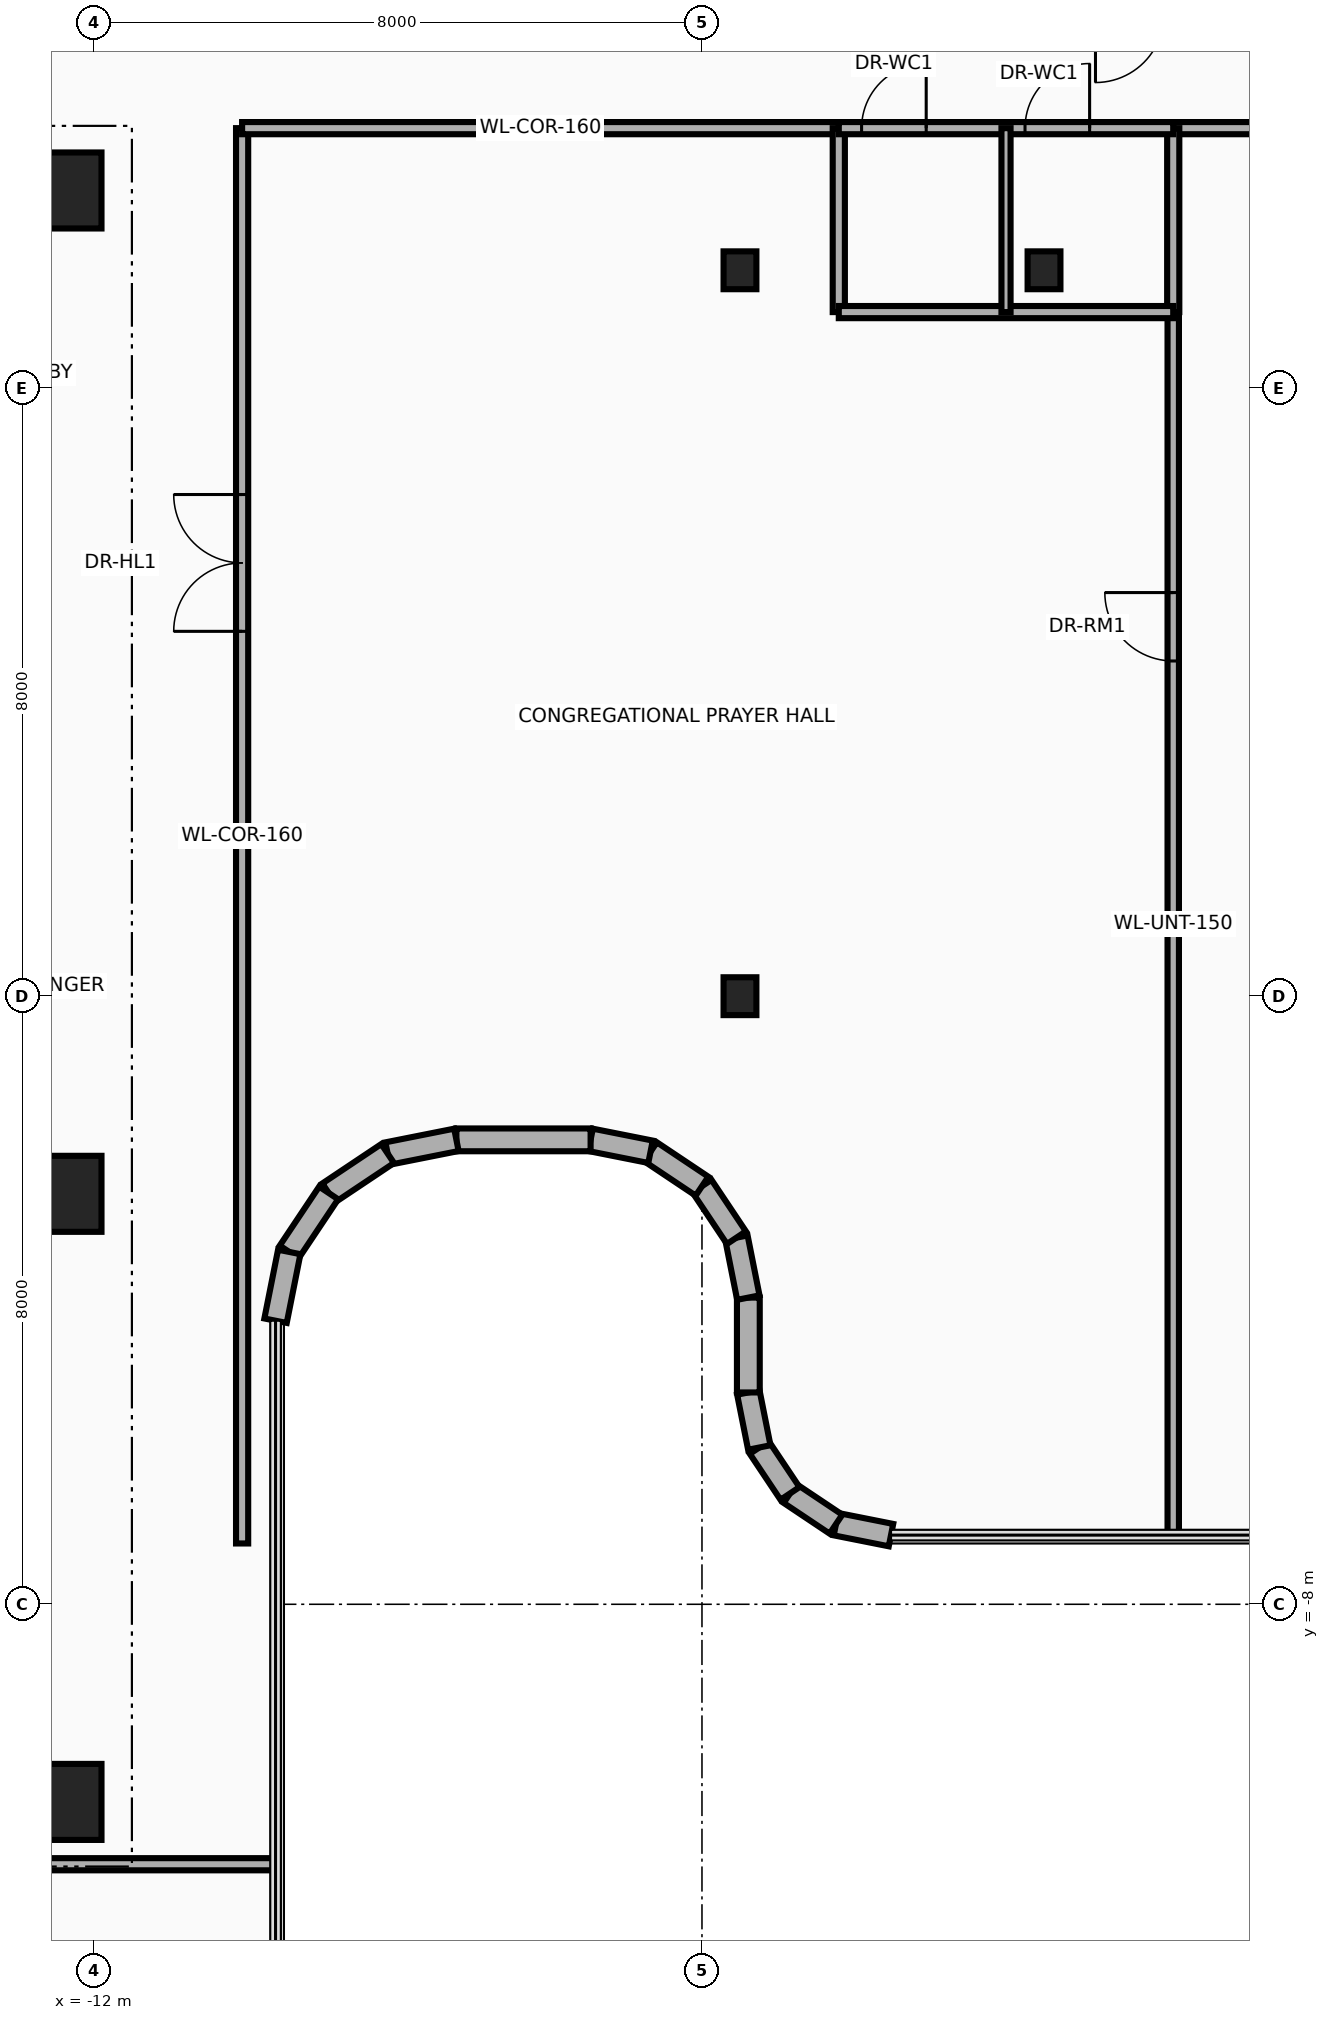
"""IFC4 building model, lengths in metres.
Left out: names, types, materials, properties, quantities, classifications, styles, units other than length and angle.
Written with IfcOpenShell. Run it as: python <this file> out.ifc"""

import sys

from ifc_helpers import new_model, si_unit, direction, frame, frame_2d, origin, origin_2d, place, context, subcontext, project, spatial, rectangle, i_section, extrude, source, transform, mapped, element, fill, save


model = new_model("IFC4")
c1 = context("Model", 3, precision=1e-05, world=origin(), true_north=direction((0.0, 1.0)))
c2 = subcontext(c1, "Body", "Model", "MODEL_VIEW")
j1 = project(units=[si_unit("LENGTHUNIT", "METRE"), si_unit("PLANEANGLEUNIT", "RADIAN")], contexts=[c1])
p1 = place(None, origin())
s1 = spatial("IfcSite", under=j1, at=p1, CompositionType="ELEMENT")
p2 = place(p1, origin())
s2 = spatial("IfcBuilding", under=s1, at=p2, CompositionType="ELEMENT")
p3 = place(p2, frame((0.0, 0.0, 192.35)))
s3 = spatial("IfcBuildingStorey", under=s2, at=p3, CompositionType="ELEMENT", Elevation=192.35)
for number, where, z_axis, x_axis in (
    (1, (-22.65, 10.8, 0.0), (0.0, 0.0, 1.0), (1.0, 0.0, 0.0)),
    (2, (-22.65, -10.8, 0.0), (0.0, 0.0, 1.0), (1.0, 0.0, 0.0)),
):
    element("IfcWall", number, at=place(p3, frame(where, z_axis=z_axis, x_axis=x_axis)), inside=s3, PredefinedType="SHEAR", context=c2, shape_type="SweptSolid", body=[
        extrude(rectangle(XDim=10.25, YDim=0.55, at=frame_2d((5.125, 0.0))), origin(), (0.0, 0.0, 1.0), 3.71),
    ])
m1 = source(origin(), c2, "Body", "SweptSolid", [
    extrude(rectangle(XDim=1.0, YDim=1.0, at=origin_2d()), origin(), (0.0, 0.0, 1.0), 3.95),
])
for number, where, z_axis, x_axis in (
    (3, (-12.4, -10.6, 0.0), (0.0, 0.0, 1.0), (1.0, 0.0, 0.0)),
    (4, (-12.4, -2.6, 0.0), (0.0, 0.0, 1.0), (1.0, 0.0, 0.0)),
    (5, (-12.4, 10.6, 0.0), (0.0, 0.0, 1.0), (1.0, 0.0, 0.0)),
):
    element("IfcColumn", number, at=place(p3, frame(where, z_axis=z_axis, x_axis=x_axis)), inside=s3, PredefinedType="COLUMN", context=c2, shape_type="MappedRepresentation", body=[
        mapped(m1, transform((0.0, 0.0, 0.0), x_axis=(1.0, 0.0, 0.0), y_axis=(0.0, 1.0, 0.0), z_axis=(0.0, 0.0, 1.0), scale=1.0)),
    ])
m2 = source(origin(), c2, "Body", "SweptSolid", [
    extrude(i_section(OverallWidth=0.432, OverallDepth=0.498, WebThickness=0.056, FlangeThickness=0.089, at=origin_2d()), origin(), (0.0, 0.0, 1.0), 3.95),
])
for number, where, z_axis, x_axis in (
    (6, (-3.5, 0.0, 0.0), (0.0, 0.0, 1.0), (1.0, 0.0, 0.0)),
    (7, (-3.5, 9.55, 0.0), (0.0, 0.0, 1.0), (1.0, 0.0, 0.0)),
    (8, (0.5, 9.55, 0.0), (0.0, 0.0, 1.0), (1.0, 0.0, 0.0)),
):
    element("IfcColumn", number, at=place(p3, frame(where, z_axis=z_axis, x_axis=x_axis)), inside=s3, PredefinedType="COLUMN", context=c2, shape_type="MappedRepresentation", body=[
        mapped(m2, transform((0.0, 0.0, 0.0), x_axis=(1.0, 0.0, 0.0), y_axis=(0.0, 1.0, 0.0), z_axis=(0.0, 0.0, 1.0), scale=1.0)),
    ])
p4 = place(p3, frame((-1.513, -7.09, 0.0), z_axis=(0.0, 0.0, 1.0), x_axis=(-0.980783640462, 0.195098566376, 0.0)))
e9 = element("IfcWall", 9, at=p4, inside=s3, PredefinedType="SOLIDWALL", context=c2, shape_type="SweptSolid", body=[
    extrude(rectangle(XDim=0.738, YDim=0.3, at=frame_2d((0.369, 0.0))), origin(), (0.0, 0.0, 1.0), 3.156),
])
p5 = place(p3, frame((-2.237, -6.946, 0.0), z_axis=(0.0, 0.0, 1.0), x_axis=(-0.831378135196, 0.555707113792, 0.0)))
e10 = element("IfcWall", 10, at=p5, inside=s3, PredefinedType="SOLIDWALL", context=c2, shape_type="SweptSolid", body=[
    extrude(rectangle(XDim=0.727, YDim=0.3, at=frame_2d((0.364, 0.0))), origin(), (0.0, 0.0, 1.0), 3.71),
])
p6 = place(p3, frame((-2.842, -6.542, 0.0), z_axis=(0.0, 0.0, 1.0), x_axis=(-0.555784030735, 0.83132671747, 0.0)))
e11 = element("IfcWall", 11, at=p6, inside=s3, PredefinedType="SOLIDWALL", context=c2, shape_type="SweptSolid", body=[
    extrude(rectangle(XDim=0.728, YDim=0.3, at=frame_2d((0.364, 0.0))), origin(), (0.0, 0.0, 1.0), 2.695),
])
p7 = place(p3, frame((-3.246, -5.937, 0.0), z_axis=(0.0, 0.0, 1.0), x_axis=(-0.194780446724, 0.980846867546, 0.0)))
e12 = element("IfcWall", 12, at=p7, inside=s3, PredefinedType="SOLIDWALL", context=c2, shape_type="SweptSolid", body=[
    extrude(rectangle(XDim=0.738, YDim=0.3, at=frame_2d((0.369, 0.0))), origin(), (0.0, 0.0, 1.0), 2.695),
])
p8 = place(p3, frame((-3.39, -5.213, 0.0), z_axis=(0.0, 0.0, 1.0), x_axis=(0.0, 1.0, 0.0)))
e13 = element("IfcWall", 13, at=p8, inside=s3, PredefinedType="SOLIDWALL", context=c2, shape_type="SweptSolid", body=[
    extrude(rectangle(XDim=1.248, YDim=0.3, at=frame_2d((0.624, 0.0))), origin(), (0.0, 0.0, 1.0), 2.695),
])
p9 = place(p3, frame((-3.39, -3.965, 0.0), z_axis=(0.0, 0.0, 1.0), x_axis=(-0.195356525272, 0.980732291726, 0.0)))
e14 = element("IfcWall", 14, at=p9, inside=s3, PredefinedType="SOLIDWALL", context=c2, shape_type="SweptSolid", body=[
    extrude(rectangle(XDim=0.803, YDim=0.3, at=frame_2d((0.402, 0.0))), origin(), (0.0, 0.0, 1.0), 2.695),
])
for number, where, z_axis, x_axis in (
    (15, (-3.547, -3.177, 0.0), (0.0, 0.0, 1.0), (-0.556, 0.831, 0.0)),
    (16, (-4.0, -2.5, 0.0), (0.0, 0.0, 1.0), (-0.831, 0.556, 0.0)),
):
    element("IfcWall", number, at=place(p3, frame(where, z_axis=z_axis, x_axis=x_axis)), inside=s3, PredefinedType="SOLIDWALL", context=c2, shape_type="SweptSolid", body=[
        extrude(rectangle(XDim=0.815, YDim=0.3, at=frame_2d((0.407, 0.0))), origin(), (0.0, 0.0, 1.0), 2.695),
    ])
p10 = place(p3, frame((-4.677, -2.047, 0.0), z_axis=(0.0, 0.0, 1.0), x_axis=(-0.980732291726, 0.195356525272, 0.0)))
e17 = element("IfcWall", 17, at=p10, inside=s3, PredefinedType="SOLIDWALL", context=c2, shape_type="SweptSolid", body=[
    extrude(rectangle(XDim=0.803, YDim=0.3, at=frame_2d((0.402, 0.0))), origin(), (0.0, 0.0, 1.0), 3.71),
])
p11 = place(p3, frame((-5.465, -1.89, 0.0), z_axis=(0.0, 0.0, 1.0), x_axis=(-1.0, 0.0, 0.0)))
e18 = element("IfcWall", 18, at=p11, inside=s3, PredefinedType="SOLIDWALL", context=c2, shape_type="SweptSolid", body=[
    extrude(rectangle(XDim=1.766, YDim=0.3, at=frame_2d((0.883, 0.0))), origin(), (0.0, 0.0, 1.0), 3.71),
])
p12 = place(p3, frame((-7.231, -1.89, 0.0), z_axis=(0.0, 0.0, 1.0), x_axis=(-0.980743190895, -0.195301801101, 0.0)))
e19 = element("IfcWall", 19, at=p12, inside=s3, PredefinedType="SOLIDWALL", context=c2, shape_type="SweptSolid", body=[
    extrude(rectangle(XDim=0.923, YDim=0.3, at=frame_2d((0.461, 0.0))), origin(), (0.0, 0.0, 1.0), 2.495),
])
p13 = place(p3, frame((-8.135, -2.07, 0.0), z_axis=(0.0, 0.0, 1.0), x_axis=(-0.831607331814, -0.555364065883, 0.0)))
e20 = element("IfcWall", 20, at=p13, inside=s3, PredefinedType="SOLIDWALL", context=c2, shape_type="SweptSolid", body=[
    extrude(rectangle(XDim=0.933, YDim=0.3, at=frame_2d((0.467, 0.0))), origin(), (0.0, 0.0, 1.0), 2.495),
])
p14 = place(p3, frame((-8.912, -2.588, 0.0), z_axis=(0.0, 0.0, 1.0), x_axis=(-0.555364065883, -0.831607331814, 0.0)))
e21 = element("IfcWall", 21, at=p14, inside=s3, PredefinedType="SOLIDWALL", context=c2, shape_type="SweptSolid", body=[
    extrude(rectangle(XDim=0.933, YDim=0.3, at=frame_2d((0.467, 0.0))), origin(), (0.0, 0.0, 1.0), 3.71),
])
p15 = place(p3, frame((-9.43, -3.365, 0.0), z_axis=(0.0, 0.0, 1.0), x_axis=(-0.195301801101, -0.980743190895, 0.0)))
e22 = element("IfcWall", 22, at=p15, inside=s3, PredefinedType="SOLIDWALL", context=c2, shape_type="SweptSolid", body=[
    extrude(rectangle(XDim=0.923, YDim=0.3, at=frame_2d((0.461, 0.0))), origin(), (0.0, 0.0, 1.0), 3.71),
])
p16 = place(p3, frame((-23.45, -11.42, 0.0), z_axis=(0.0, 0.0, 1.0), x_axis=(1.0, 0.0, 0.0)))
e23 = element("IfcWall", 23, at=p16, inside=s3, PredefinedType="PARTITIONING", context=c2, shape_type="SweptSolid", body=[
    extrude(rectangle(XDim=13.84, YDim=0.16, at=frame_2d((6.92, 0.0))), origin(), (0.0, 0.0, 1.0), 3.084),
])
p17 = place(p3, frame((-10.05, -7.2, 0.0), z_axis=(0.0, 0.0, 1.0), x_axis=(0.0, 1.0, 0.0)))
e24 = element("IfcWall", 24, at=p17, inside=s3, PredefinedType="PARTITIONING", context=c2, shape_type="SweptSolid", body=[
    extrude(rectangle(XDim=18.62, YDim=0.16, at=frame_2d((9.31, 0.0))), origin(), (0.0, 0.0, 1.0), 2.495),
])
p18 = place(p17, frame((12.0, 0.0, 0.0)))
e25 = element("IfcOpeningElement", 25, at=p18, cuts=e24, PredefinedType="OPENING", context=c2, shape_type="SweptSolid", body=[
    extrude(rectangle(XDim=1.8, YDim=2.15, at=frame_2d((0.9, 1.075))), frame((0.0, 0.095, 0.0), z_axis=(0.0, -1.0, 0.0), x_axis=(1.0, 0.0, 0.0)), (0.0, 0.0, 1.0), 0.19),
])
p19 = place(p3, frame((-10.05, 11.42, 0.0), z_axis=(0.0, 0.0, 1.0), x_axis=(1.0, 0.0, 0.0)))
e26 = element("IfcWall", 26, at=p19, inside=s3, PredefinedType="PARTITIONING", context=c2, shape_type="SweptSolid", body=[
    extrude(rectangle(XDim=7.85, YDim=0.16, at=frame_2d((3.925, 0.0))), origin(), (0.0, 0.0, 1.0), 2.695),
])
p20 = place(p3, frame((2.2, 11.42, 0.0), z_axis=(0.0, 0.0, 1.0), x_axis=(1.0, 0.0, 0.0)))
e27 = element("IfcWall", 27, at=p20, inside=s3, PredefinedType="PARTITIONING", context=c2, shape_type="SweptSolid", body=[
    extrude(rectangle(XDim=11.22, YDim=0.16, at=frame_2d((5.61, 0.0))), origin(), (0.0, 0.0, 1.0), 2.695),
])
p21 = place(p20, frame((4.0, 0.0, 0.0)))
e28 = element("IfcOpeningElement", 28, at=p21, cuts=e27, PredefinedType="OPENING", context=c2, shape_type="SweptSolid", body=[
    extrude(rectangle(XDim=1.8, YDim=2.15, at=frame_2d((0.9, 1.075))), frame((0.0, 0.095, 0.0), z_axis=(0.0, -1.0, 0.0), x_axis=(1.0, 0.0, 0.0)), (0.0, 0.0, 1.0), 0.19),
])
p22 = place(p3, frame((2.2, -7.09, 0.0), z_axis=(0.0, 0.0, 1.0), x_axis=(0.0, 1.0, 0.0)))
e29 = element("IfcWall", 29, at=p22, inside=s3, PredefinedType="PARTITIONING", context=c2, shape_type="SweptSolid", body=[
    extrude(rectangle(XDim=16.09, YDim=0.15, at=frame_2d((8.045, 0.0))), origin(), (0.0, 0.0, 1.0), 2.994),
])
p23 = place(p22, frame((11.5, 0.0, 0.0)))
e30 = element("IfcOpeningElement", 30, at=p23, cuts=e29, PredefinedType="OPENING", context=c2, shape_type="SweptSolid", body=[
    extrude(rectangle(XDim=0.9, YDim=2.1, at=frame_2d((0.45, 1.05))), frame((0.0, 0.09, 0.0), z_axis=(0.0, -1.0, 0.0), x_axis=(1.0, 0.0, 0.0)), (0.0, 0.0, 1.0), 0.18),
])
for number, where, z_axis, x_axis in (
    (31, (-2.2, 9.0, 0.0), (0.0, 0.0, 1.0), (0.0, 1.0, 0.0)),
    (32, (2.2, 9.0, 0.0), (0.0, 0.0, 1.0), (0.0, 1.0, 0.0)),
):
    element("IfcWall", number, at=place(p3, frame(where, z_axis=z_axis, x_axis=x_axis)), inside=s3, PredefinedType="PARTITIONING", context=c2, shape_type="SweptSolid", body=[
        extrude(rectangle(XDim=2.42, YDim=0.16, at=frame_2d((1.21, 0.0))), origin(), (0.0, 0.0, 1.0), 2.994),
    ])
p24 = place(p3, frame((-2.2, 9.0, 0.0), z_axis=(0.0, 0.0, 1.0), x_axis=(1.0, 0.0, 0.0)))
e33 = element("IfcWall", 33, at=p24, inside=s3, PredefinedType="PARTITIONING", context=c2, shape_type="SweptSolid", body=[
    extrude(rectangle(XDim=4.4, YDim=0.16, at=frame_2d((2.2, 0.0))), origin(), (0.0, 0.0, 1.0), 3.71),
])
p25 = place(p3, frame((-2.2, 11.42, 0.0), z_axis=(0.0, 0.0, 1.0), x_axis=(1.0, 0.0, 0.0)))
e34 = element("IfcWall", 34, at=p25, inside=s3, PredefinedType="PARTITIONING", context=c2, shape_type="SweptSolid", body=[
    extrude(rectangle(XDim=4.4, YDim=0.16, at=frame_2d((2.2, 0.0))), origin(), (0.0, 0.0, 1.0), 3.156),
])
p26 = place(p25, frame((0.3, 0.0, 0.0)))
e35 = element("IfcOpeningElement", 35, at=p26, cuts=e34, PredefinedType="OPENING", context=c2, shape_type="SweptSolid", body=[
    extrude(rectangle(XDim=0.85, YDim=2.1, at=frame_2d((0.425, 1.05))), frame((0.0, 0.095, 0.0), z_axis=(0.0, -1.0, 0.0), x_axis=(1.0, 0.0, 0.0)), (0.0, 0.0, 1.0), 0.19),
])
p27 = place(p25, frame((2.45, 0.0, 0.0)))
e36 = element("IfcOpeningElement", 36, at=p27, cuts=e34, PredefinedType="OPENING", context=c2, shape_type="SweptSolid", body=[
    extrude(rectangle(XDim=0.85, YDim=2.1, at=frame_2d((0.425, 1.05))), frame((0.0, 0.095, 0.0), z_axis=(0.0, -1.0, 0.0), x_axis=(1.0, 0.0, 0.0)), (0.0, 0.0, 1.0), 0.19),
])
p28 = place(p3, frame((0.0, 9.0, 0.0), z_axis=(0.0, 0.0, 1.0), x_axis=(0.0, 1.0, 0.0)))
e37 = element("IfcWall", 37, at=p28, inside=s3, PredefinedType="PARTITIONING", context=c2, shape_type="SweptSolid", body=[
    extrude(rectangle(XDim=2.42, YDim=0.12, at=frame_2d((1.21, 0.0))), origin(), (0.0, 0.0, 1.0), 2.994),
])
p29 = place(p18, origin())
e38 = element("IfcDoor", 38, at=p29, inside=s3, OperationType="DOUBLE_DOOR_SINGLE_SWING", PredefinedType="DOOR", context=c2, shape_type="SweptSolid", body=[
    extrude(rectangle(XDim=1.8, YDim=2.15, at=frame_2d((0.9, 1.075))), frame((0.0, 0.025, 0.0), z_axis=(0.0, -1.0, 0.0), x_axis=(1.0, 0.0, 0.0)), (0.0, 0.0, 1.0), 0.05),
])
fill(e25, e38)
p30 = place(p23, origin())
e39 = element("IfcDoor", 39, at=p30, inside=s3, OperationType="SINGLE_SWING_RIGHT", PredefinedType="DOOR", context=c2, shape_type="SweptSolid", body=[
    extrude(rectangle(XDim=0.9, YDim=2.1, at=frame_2d((0.45, 1.05))), frame((0.0, 0.025, 0.0), z_axis=(0.0, -1.0, 0.0), x_axis=(1.0, 0.0, 0.0)), (0.0, 0.0, 1.0), 0.05),
])
fill(e30, e39)
p31 = place(p26, origin())
e40 = element("IfcDoor", 40, at=p31, inside=s3, OperationType="SINGLE_SWING_LEFT", PredefinedType="DOOR", context=c2, shape_type="SweptSolid", body=[
    extrude(rectangle(XDim=0.85, YDim=2.1, at=frame_2d((0.425, 1.05))), frame((0.0, 0.025, 0.0), z_axis=(0.0, -1.0, 0.0), x_axis=(1.0, 0.0, 0.0)), (0.0, 0.0, 1.0), 0.05),
])
fill(e35, e40)
p32 = place(p27, origin())
e41 = element("IfcDoor", 41, at=p32, inside=s3, OperationType="SINGLE_SWING_RIGHT", PredefinedType="DOOR", context=c2, shape_type="SweptSolid", body=[
    extrude(rectangle(XDim=0.85, YDim=2.1, at=frame_2d((0.425, 1.05))), frame((0.0, 0.025, 0.0), z_axis=(0.0, -1.0, 0.0), x_axis=(1.0, 0.0, 0.0)), (0.0, 0.0, 1.0), 0.05),
])
fill(e36, e41)
save(model, sys.argv[1])
